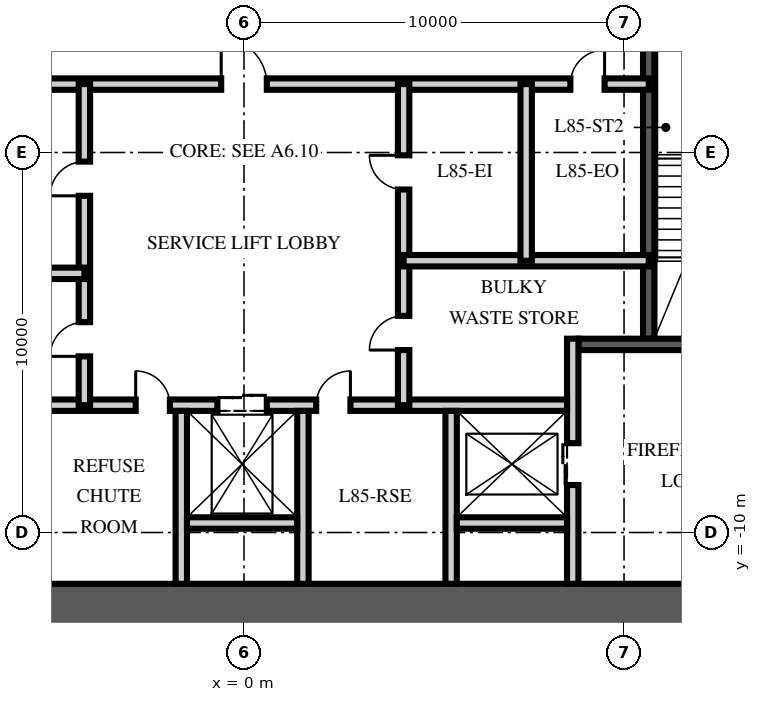
"""IFC4 building model, lengths in metres.
Left out: names, types, materials, properties, quantities, classifications, styles, units other than length and angle.
Written with IfcOpenShell. Run it as: python <this file> out.ifc"""

import sys

from ifc_helpers import new_model, si_unit, direction, frame, frame_2d, origin, place, context, subcontext, project, spatial, rectangle, extrude, element, fill, save


model = new_model("IFC4")
c1 = context("Model", 3, precision=1e-05, world=origin(), true_north=direction((0.0, 1.0)))
c2 = subcontext(c1, "Body", "Model", "MODEL_VIEW")
j1 = project(units=[si_unit("LENGTHUNIT", "METRE"), si_unit("PLANEANGLEUNIT", "RADIAN")], contexts=[c1])
p1 = place(None, origin())
s1 = spatial("IfcSite", under=j1, at=p1, CompositionType="ELEMENT")
p2 = place(p1, origin())
s2 = spatial("IfcBuilding", under=s1, at=p2, CompositionType="ELEMENT")
p3 = place(p2, frame((0.0, 0.0, 338.25)))
s3 = spatial("IfcBuildingStorey", under=s2, at=p3, CompositionType="ELEMENT", Elevation=338.25)
p4 = place(p3, frame((-15.5, -12.0, -0.25), z_axis=(0.0, 0.0, 1.0), x_axis=(1.0, 0.0, 0.0)))
e1 = element("IfcWall", 1, at=p4, inside=s3, PredefinedType="SHEAR", context=c2, shape_type="SweptSolid", body=[
    extrude(rectangle(XDim=31.0, YDim=1.3, at=frame_2d((15.5, 0.0))), origin(), (0.0, 0.0, 1.0), 3.75),
])
p5 = place(p3, frame((10.65, -4.9, 0.0), z_axis=(0.0, 0.0, 1.0), x_axis=(0.0, 1.0, 0.0)))
e2 = element("IfcWall", 2, at=p5, inside=s3, PredefinedType="SOLIDWALL", context=c2, shape_type="SweptSolid", body=[
    extrude(rectangle(XDim=10.1, YDim=0.3, at=frame_2d((5.05, 0.0))), origin(), (0.0, 0.0, 1.0), 3.5),
])
p6 = place(p3, frame((14.85, -5.05, 0.0), z_axis=(0.0, 0.0, 1.0), x_axis=(-1.0, 0.0, 0.0)))
e3 = element("IfcWall", 3, at=p6, inside=s3, PredefinedType="SOLIDWALL", context=c2, shape_type="SweptSolid", body=[
    extrude(rectangle(XDim=6.05, YDim=0.3, at=frame_2d((3.025, 0.0))), origin(), (0.0, 0.0, 1.0), 3.5),
])
p7 = place(p6, frame((1.425, 0.0, 0.0)))
e4 = element("IfcOpeningElement", 4, at=p7, cuts=e3, PredefinedType="OPENING", context=c2, shape_type="SweptSolid", body=[
    extrude(rectangle(XDim=1.2, YDim=2.1, at=frame_2d((0.6, 1.05))), frame((0.0, 0.16, 0.0), z_axis=(0.0, -1.0, 0.0), x_axis=(1.0, 0.0, 0.0)), (0.0, 0.0, 1.0), 0.32),
])
p8 = place(p3, frame((8.65, -11.35, 0.0), z_axis=(0.0, 0.0, 1.0), x_axis=(0.0, 1.0, 0.0)))
e5 = element("IfcWall", 5, at=p8, inside=s3, PredefinedType="PARTITIONING", context=c2, shape_type="SweptSolid", body=[
    extrude(rectangle(XDim=6.45, YDim=0.3, at=frame_2d((3.225, 0.0))), origin(), (0.0, 0.0, 1.0), 3.5),
])
p9 = place(p8, frame((2.6, 0.0, 0.0)))
e6 = element("IfcOpeningElement", 6, at=p9, cuts=e5, PredefinedType="OPENING", context=c2, shape_type="SweptSolid", body=[
    extrude(rectangle(XDim=1.1, YDim=2.1, at=frame_2d((0.55, 1.05))), frame((0.0, 0.16, 0.0), z_axis=(0.0, -1.0, 0.0), x_axis=(1.0, 0.0, 0.0)), (0.0, 0.0, 1.0), 0.32),
])
p10 = place(p3, frame((-8.5, -6.65, 0.0), z_axis=(0.0, 0.0, 1.0), x_axis=(1.0, 0.0, 0.0)))
e7 = element("IfcWall", 7, at=p10, inside=s3, PredefinedType="PARTITIONING", context=c2, shape_type="SweptSolid", body=[
    extrude(rectangle(XDim=17.0, YDim=0.3, at=frame_2d((8.5, 0.0))), origin(), (0.0, 0.0, 1.0), 3.5),
])
p11 = place(p10, frame((7.8, 0.0, 0.0)))
e8 = element("IfcOpeningElement", 8, at=p11, cuts=e7, PredefinedType="OPENING", context=c2, shape_type="SweptSolid", body=[
    extrude(rectangle(XDim=1.3, YDim=2.4, at=frame_2d((0.65, 1.2))), frame((0.0, 0.16, 0.0), z_axis=(0.0, -1.0, 0.0), x_axis=(1.0, 0.0, 0.0)), (0.0, 0.0, 1.0), 0.32),
])
p12 = place(p10, frame((5.65, 0.0, 0.0)))
e9 = element("IfcOpeningElement", 9, at=p12, cuts=e7, PredefinedType="OPENING", context=c2, shape_type="SweptSolid", body=[
    extrude(rectangle(XDim=0.9, YDim=2.1, at=frame_2d((0.45, 1.05))), frame((0.0, 0.16, 0.0), z_axis=(0.0, -1.0, 0.0), x_axis=(1.0, 0.0, 0.0)), (0.0, 0.0, 1.0), 0.32),
])
p13 = place(p10, frame((10.4, 0.0, 0.0)))
e10 = element("IfcOpeningElement", 10, at=p13, cuts=e7, PredefinedType="OPENING", context=c2, shape_type="SweptSolid", body=[
    extrude(rectangle(XDim=0.9, YDim=2.1, at=frame_2d((0.45, 1.05))), frame((0.0, 0.16, 0.0), z_axis=(0.0, -1.0, 0.0), x_axis=(1.0, 0.0, 0.0)), (0.0, 0.0, 1.0), 0.32),
])
for number, where, z_axis, x_axis in (
    (11, (-1.65, -11.35, 0.0), (0.0, 0.0, 1.0), (0.0, 1.0, 0.0)),
    (12, (1.55, -11.35, 0.0), (0.0, 0.0, 1.0), (0.0, 1.0, 0.0)),
    (13, (5.45, -11.35, 0.0), (0.0, 0.0, 1.0), (0.0, 1.0, 0.0)),
):
    element("IfcWall", number, at=place(p3, frame(where, z_axis=z_axis, x_axis=x_axis)), inside=s3, PredefinedType="PARTITIONING", context=c2, shape_type="SweptSolid", body=[
        extrude(rectangle(XDim=4.55, YDim=0.3, at=frame_2d((2.275, 0.0))), origin(), (0.0, 0.0, 1.0), 3.5),
    ])
for number, where, z_axis, x_axis in (
    (14, (-1.5, -9.75, 0.0), (0.0, 0.0, 1.0), (1.0, 0.0, 0.0)),
    (15, (5.6, -9.75, 0.0), (0.0, 0.0, 1.0), (1.0, 0.0, 0.0)),
):
    element("IfcWall", number, at=place(p3, frame(where, z_axis=z_axis, x_axis=x_axis)), inside=s3, PredefinedType="PARTITIONING", context=c2, shape_type="SweptSolid", body=[
        extrude(rectangle(XDim=2.9, YDim=0.3, at=frame_2d((1.45, 0.0))), origin(), (0.0, 0.0, 1.0), 3.5),
    ])
p14 = place(p3, frame((-10.65, 1.8, 0.0), z_axis=(0.0, 0.0, 1.0), x_axis=(1.0, 0.0, 0.0)))
e16 = element("IfcWall", 16, at=p14, inside=s3, PredefinedType="PARTITIONING", context=c2, shape_type="SweptSolid", body=[
    extrude(rectangle(XDim=21.3, YDim=0.3, at=frame_2d((10.65, 0.0))), origin(), (0.0, 0.0, 1.0), 3.5),
])
p15 = place(p14, frame((10.05, 0.0, 0.0)))
e17 = element("IfcOpeningElement", 17, at=p15, cuts=e16, PredefinedType="OPENING", context=c2, shape_type="SweptSolid", body=[
    extrude(rectangle(XDim=1.2, YDim=2.1, at=frame_2d((0.6, 1.05))), frame((0.0, 0.16, 0.0), z_axis=(0.0, -1.0, 0.0), x_axis=(1.0, 0.0, 0.0)), (0.0, 0.0, 1.0), 0.32),
])
p16 = place(p14, frame((19.238, 0.0, 0.0)))
e18 = element("IfcOpeningElement", 18, at=p16, cuts=e16, PredefinedType="OPENING", context=c2, shape_type="SweptSolid", body=[
    extrude(rectangle(XDim=0.9, YDim=2.1, at=frame_2d((0.45, 1.05))), frame((0.0, 0.16, 0.0), z_axis=(0.0, -1.0, 0.0), x_axis=(1.0, 0.0, 0.0)), (0.0, 0.0, 1.0), 0.32),
])
p17 = place(p3, frame((-4.2, -6.65, 0.0), z_axis=(0.0, 0.0, 1.0), x_axis=(0.0, 1.0, 0.0)))
e19 = element("IfcWall", 19, at=p17, inside=s3, PredefinedType="PARTITIONING", context=c2, shape_type="SweptSolid", body=[
    extrude(rectangle(XDim=8.45, YDim=0.3, at=frame_2d((4.225, 0.0))), origin(), (0.0, 0.0, 1.0), 3.5),
])
p18 = place(p17, frame((1.285, 0.0, 0.0)))
e20 = element("IfcOpeningElement", 20, at=p18, cuts=e19, PredefinedType="OPENING", context=c2, shape_type="SweptSolid", body=[
    extrude(rectangle(XDim=0.9, YDim=2.1, at=frame_2d((0.45, 1.05))), frame((0.0, 0.16, 0.0), z_axis=(0.0, -1.0, 0.0), x_axis=(1.0, 0.0, 0.0)), (0.0, 0.0, 1.0), 0.32),
])
p19 = place(p17, frame((5.51, 0.0, 0.0)))
e21 = element("IfcOpeningElement", 21, at=p19, cuts=e19, PredefinedType="OPENING", context=c2, shape_type="SweptSolid", body=[
    extrude(rectangle(XDim=0.9, YDim=2.1, at=frame_2d((0.45, 1.05))), frame((0.0, 0.16, 0.0), z_axis=(0.0, -1.0, 0.0), x_axis=(1.0, 0.0, 0.0)), (0.0, 0.0, 1.0), 0.32),
])
p20 = place(p3, frame((4.2, -6.65, 0.0), z_axis=(0.0, 0.0, 1.0), x_axis=(0.0, 1.0, 0.0)))
e22 = element("IfcWall", 22, at=p20, inside=s3, PredefinedType="PARTITIONING", context=c2, shape_type="SweptSolid", body=[
    extrude(rectangle(XDim=8.45, YDim=0.3, at=frame_2d((4.225, 0.0))), origin(), (0.0, 0.0, 1.0), 3.5),
])
p21 = place(p20, frame((1.451, 0.0, 0.0)))
e23 = element("IfcOpeningElement", 23, at=p21, cuts=e22, PredefinedType="OPENING", context=c2, shape_type="SweptSolid", body=[
    extrude(rectangle(XDim=0.9, YDim=2.1, at=frame_2d((0.45, 1.05))), frame((0.0, 0.16, 0.0), z_axis=(0.0, -1.0, 0.0), x_axis=(1.0, 0.0, 0.0)), (0.0, 0.0, 1.0), 0.32),
])
p22 = place(p20, frame((5.676, 0.0, 0.0)))
e24 = element("IfcOpeningElement", 24, at=p22, cuts=e22, PredefinedType="OPENING", context=c2, shape_type="SweptSolid", body=[
    extrude(rectangle(XDim=0.9, YDim=2.1, at=frame_2d((0.45, 1.05))), frame((0.0, 0.16, 0.0), z_axis=(0.0, -1.0, 0.0), x_axis=(1.0, 0.0, 0.0)), (0.0, 0.0, 1.0), 0.32),
])
for number, where, z_axis, x_axis in (
    (25, (-10.65, -3.18, 0.0), (0.0, 0.0, 1.0), (1.0, 0.0, 0.0)),
    (26, (10.65, -2.848, 0.0), (0.0, 0.0, 1.0), (-1.0, 0.0, 0.0)),
):
    element("IfcWall", number, at=place(p3, frame(where, z_axis=z_axis, x_axis=x_axis)), inside=s3, PredefinedType="PARTITIONING", context=c2, shape_type="SweptSolid", body=[
        extrude(rectangle(XDim=6.45, YDim=0.3, at=frame_2d((3.225, 0.0))), origin(), (0.0, 0.0, 1.0), 3.5),
    ])
p23 = place(p3, frame((7.425, -2.848, 0.0), z_axis=(0.0, 0.0, 1.0), x_axis=(0.0, 1.0, 0.0)))
e27 = element("IfcWall", 27, at=p23, inside=s3, PredefinedType="PARTITIONING", context=c2, shape_type="SweptSolid", body=[
    extrude(rectangle(XDim=4.648, YDim=0.3, at=frame_2d((2.324, 0.0))), origin(), (0.0, 0.0, 1.0), 3.5),
])
p24 = place(p9, origin())
e28 = element("IfcDoor", 28, at=p24, inside=s3, OperationType="DOUBLE_DOOR_SLIDING", PredefinedType="DOOR", context=c2, shape_type="SweptSolid", body=[
    extrude(rectangle(XDim=1.1, YDim=2.1, at=frame_2d((0.55, 1.05))), frame((0.0, 0.025, 0.0), z_axis=(0.0, -1.0, 0.0), x_axis=(1.0, 0.0, 0.0)), (0.0, 0.0, 1.0), 0.05),
])
fill(e6, e28)
p25 = place(p11, origin())
e29 = element("IfcDoor", 29, at=p25, inside=s3, OperationType="DOUBLE_DOOR_SLIDING", PredefinedType="DOOR", context=c2, shape_type="SweptSolid", body=[
    extrude(rectangle(XDim=1.3, YDim=2.4, at=frame_2d((0.65, 1.2))), frame((0.0, 0.025, 0.0), z_axis=(0.0, -1.0, 0.0), x_axis=(1.0, 0.0, 0.0)), (0.0, 0.0, 1.0), 0.05),
])
fill(e8, e29)
p26 = place(p15, origin())
e30 = element("IfcDoor", 30, at=p26, inside=s3, OperationType="SINGLE_SWING_LEFT", PredefinedType="DOOR", context=c2, shape_type="SweptSolid", body=[
    extrude(rectangle(XDim=1.2, YDim=2.1, at=frame_2d((0.6, 1.05))), frame((0.0, 0.025, 0.0), z_axis=(0.0, -1.0, 0.0), x_axis=(1.0, 0.0, 0.0)), (0.0, 0.0, 1.0), 0.05),
])
fill(e17, e30)
p27 = place(p12, origin())
e31 = element("IfcDoor", 31, at=p27, inside=s3, OperationType="SINGLE_SWING_LEFT", PredefinedType="DOOR", context=c2, shape_type="SweptSolid", body=[
    extrude(rectangle(XDim=0.9, YDim=2.1, at=frame_2d((0.45, 1.05))), frame((0.0, 0.025, 0.0), z_axis=(0.0, -1.0, 0.0), x_axis=(1.0, 0.0, 0.0)), (0.0, 0.0, 1.0), 0.05),
])
fill(e9, e31)
p28 = place(p13, origin())
e32 = element("IfcDoor", 32, at=p28, inside=s3, OperationType="SINGLE_SWING_RIGHT", PredefinedType="DOOR", context=c2, shape_type="SweptSolid", body=[
    extrude(rectangle(XDim=0.9, YDim=2.1, at=frame_2d((0.45, 1.05))), frame((0.0, 0.025, 0.0), z_axis=(0.0, -1.0, 0.0), x_axis=(1.0, 0.0, 0.0)), (0.0, 0.0, 1.0), 0.05),
])
fill(e10, e32)
p29 = place(p18, origin())
e33 = element("IfcDoor", 33, at=p29, inside=s3, OperationType="SINGLE_SWING_LEFT", PredefinedType="DOOR", context=c2, shape_type="SweptSolid", body=[
    extrude(rectangle(XDim=0.9, YDim=2.1, at=frame_2d((0.45, 1.05))), frame((0.0, 0.025, 0.0), z_axis=(0.0, -1.0, 0.0), x_axis=(1.0, 0.0, 0.0)), (0.0, 0.0, 1.0), 0.05),
])
fill(e20, e33)
p30 = place(p19, origin())
e34 = element("IfcDoor", 34, at=p30, inside=s3, OperationType="SINGLE_SWING_LEFT", PredefinedType="DOOR", context=c2, shape_type="SweptSolid", body=[
    extrude(rectangle(XDim=0.9, YDim=2.1, at=frame_2d((0.45, 1.05))), frame((0.0, 0.025, 0.0), z_axis=(0.0, -1.0, 0.0), x_axis=(1.0, 0.0, 0.0)), (0.0, 0.0, 1.0), 0.05),
])
fill(e21, e34)
p31 = place(p21, origin())
e35 = element("IfcDoor", 35, at=p31, inside=s3, OperationType="SINGLE_SWING_LEFT", PredefinedType="DOOR", context=c2, shape_type="SweptSolid", body=[
    extrude(rectangle(XDim=0.9, YDim=2.1, at=frame_2d((0.45, 1.05))), frame((0.0, 0.025, 0.0), z_axis=(0.0, -1.0, 0.0), x_axis=(1.0, 0.0, 0.0)), (0.0, 0.0, 1.0), 0.05),
])
fill(e23, e35)
p32 = place(p22, origin())
e36 = element("IfcDoor", 36, at=p32, inside=s3, OperationType="SINGLE_SWING_RIGHT", PredefinedType="DOOR", context=c2, shape_type="SweptSolid", body=[
    extrude(rectangle(XDim=0.9, YDim=2.1, at=frame_2d((0.45, 1.05))), frame((0.0, 0.025, 0.0), z_axis=(0.0, -1.0, 0.0), x_axis=(1.0, 0.0, 0.0)), (0.0, 0.0, 1.0), 0.05),
])
fill(e24, e36)
p33 = place(p16, origin())
e37 = element("IfcDoor", 37, at=p33, inside=s3, OperationType="SINGLE_SWING_RIGHT", PredefinedType="DOOR", context=c2, shape_type="SweptSolid", body=[
    extrude(rectangle(XDim=0.9, YDim=2.1, at=frame_2d((0.45, 1.05))), frame((0.0, 0.025, 0.0), z_axis=(0.0, -1.0, 0.0), x_axis=(1.0, 0.0, 0.0)), (0.0, 0.0, 1.0), 0.05),
])
fill(e18, e37)
save(model, sys.argv[1])
